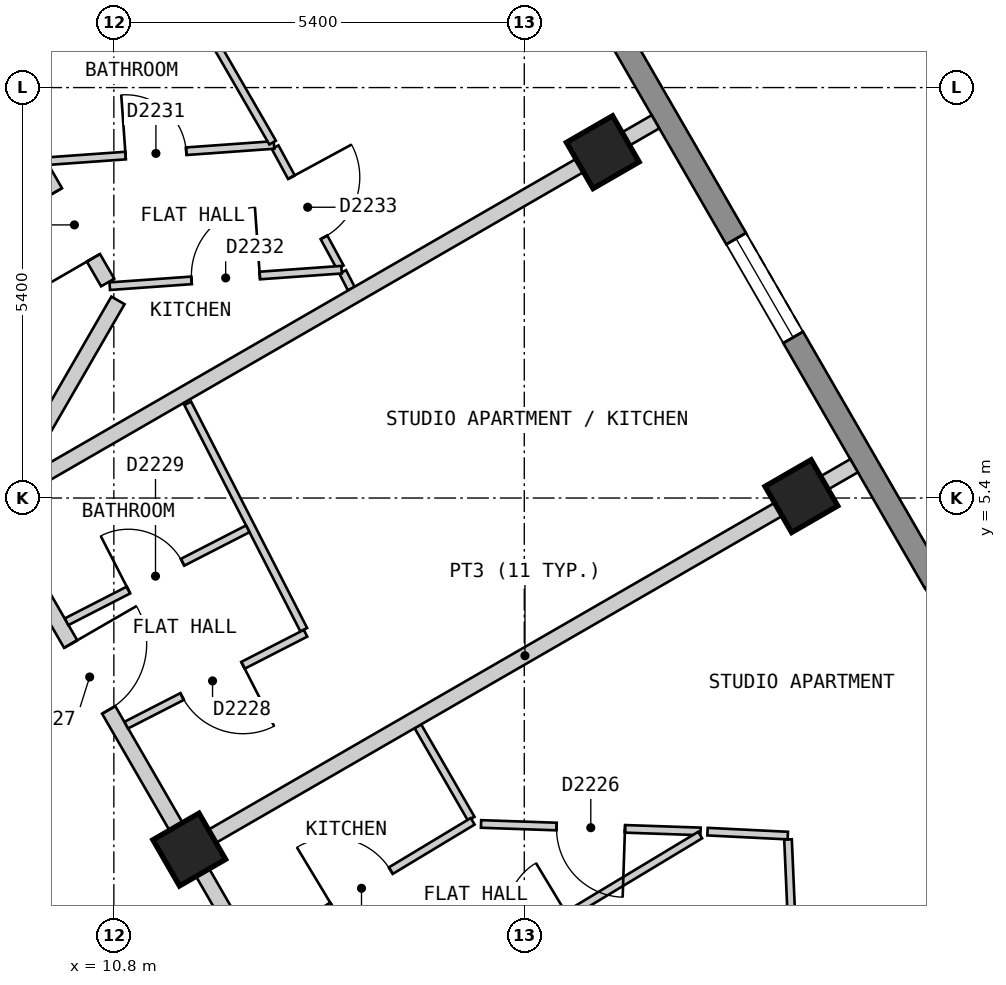
"""IFC4 building model, lengths in metres.
Left out: names, types, materials, properties, quantities, classifications, styles, units other than length and angle.
Written with IfcOpenShell. Run it as: python <this file> out.ifc"""

import sys

from ifc_helpers import new_model, si_unit, direction, frame, frame_2d, origin, origin_2d, place, context, subcontext, project, spatial, polyline, rectangle, outline, extrude, element, fill, save


model = new_model("IFC4")
c1 = context("Model", 3, precision=1e-05, world=origin(), true_north=direction((0.0, 1.0)))
c2 = subcontext(c1, "Body", "Model", "MODEL_VIEW")
j1 = project(units=[si_unit("LENGTHUNIT", "METRE"), si_unit("PLANEANGLEUNIT", "RADIAN")], contexts=[c1])
p1 = place(None, origin())
s1 = spatial("IfcSite", under=j1, at=p1, CompositionType="ELEMENT")
p2 = place(p1, origin())
s2 = spatial("IfcBuilding", under=s1, at=p2, CompositionType="ELEMENT")
p3 = place(p2, frame((0.0, 0.0, 229.8)))
s3 = spatial("IfcBuildingStorey", under=s2, at=p3, CompositionType="ELEMENT", Elevation=229.8)
for number, where, z_axis, x_axis in (
    (1, (19.846, 5.425, 0.0), (0.0, 0.0, 1.0), (-0.5, 0.866, 0.0)),
    (2, (17.233, 9.95, 0.0), (0.0, 0.0, 1.0), (-0.5, 0.866, 0.0)),
    (3, (11.792, 0.775, 0.0), (0.0, 0.0, 1.0), (-0.5, 0.866, 0.0)),
):
    element("IfcColumn", number, at=place(p3, frame(where, z_axis=z_axis, x_axis=x_axis)), inside=s3, PredefinedType="COLUMN", context=c2, shape_type="SweptSolid", body=[
        extrude(rectangle(XDim=0.7, YDim=0.7, at=origin_2d()), origin(), (0.0, 0.0, 1.0), 3.0),
    ])
p4 = place(p3, frame((23.599, 0.825, 0.0), z_axis=(0.0, 0.0, 1.0), x_axis=(-0.500003656944, 0.866023292436, 0.0)))
e4 = element("IfcWall", 4, at=p4, inside=s3, PredefinedType="SOLIDWALL", context=c2, shape_type="SweptSolid", body=[
    extrude(outline(polyline([(0.0, -0.15), (22.17, -0.15), (22.09, 0.15), (0.08, 0.15), (0.0, -0.15)])), origin(), (0.0, 0.0, 1.0), 2.7),
])
p5 = place(p4, frame((2.497, 0.0, 0.15)))
e5 = element("IfcOpeningElement", 5, at=p5, cuts=e4, PredefinedType="OPENING", context=c2, shape_type="SweptSolid", body=[
    extrude(rectangle(XDim=1.5, YDim=2.1, at=frame_2d((0.75, 1.05))), frame((0.0, 0.16, 0.0), z_axis=(0.0, -1.0, 0.0), x_axis=(1.0, 0.0, 0.0)), (0.0, 0.0, 1.0), 0.32),
])
p6 = place(p4, frame((7.723, 0.0, 0.15)))
e6 = element("IfcOpeningElement", 6, at=p6, cuts=e4, PredefinedType="OPENING", context=c2, shape_type="SweptSolid", body=[
    extrude(rectangle(XDim=1.5, YDim=2.1, at=frame_2d((0.75, 1.05))), frame((0.0, 0.16, 0.0), z_axis=(0.0, -1.0, 0.0), x_axis=(1.0, 0.0, 0.0)), (0.0, 0.0, 1.0), 0.32),
])
p7 = place(p4, frame((12.948, 0.0, 0.15)))
e7 = element("IfcOpeningElement", 7, at=p7, cuts=e4, PredefinedType="OPENING", context=c2, shape_type="SweptSolid", body=[
    extrude(rectangle(XDim=1.5, YDim=2.1, at=frame_2d((0.75, 1.05))), frame((0.0, 0.16, 0.0), z_axis=(0.0, -1.0, 0.0), x_axis=(1.0, 0.0, 0.0)), (0.0, 0.0, 1.0), 0.32),
])
p8 = place(p4, frame((18.173, 0.0, 0.15)))
e8 = element("IfcOpeningElement", 8, at=p8, cuts=e4, PredefinedType="OPENING", context=c2, shape_type="SweptSolid", body=[
    extrude(rectangle(XDim=1.5, YDim=2.1, at=frame_2d((0.75, 1.05))), frame((0.0, 0.16, 0.0), z_axis=(0.0, -1.0, 0.0), x_axis=(1.0, 0.0, 0.0)), (0.0, 0.0, 1.0), 0.32),
])
p9 = place(p3, frame((9.238, 5.2, 0.0), z_axis=(0.0, 0.0, 1.0), x_axis=(0.500025705601, -0.86601056214, 0.0)))
e9 = element("IfcWall", 9, at=p9, inside=s3, PredefinedType="PARTITIONING", context=c2, shape_type="SweptSolid", body=[
    extrude(rectangle(XDim=7.735, YDim=0.2, at=frame_2d((3.868, 0.0))), origin(), (0.0, 0.0, 1.0), 2.7),
])
p10 = place(p9, frame((6.898, 0.0, 0.0)))
e10 = element("IfcOpeningElement", 10, at=p10, cuts=e9, PredefinedType="OPENING", context=c2, shape_type="SweptSolid", body=[
    extrude(rectangle(XDim=0.8, YDim=2.1, at=frame_2d((0.4, 1.05))), frame((0.0, 0.11, 0.0), z_axis=(0.0, -1.0, 0.0), x_axis=(1.0, 0.0, 0.0)), (0.0, 0.0, 1.0), 0.22),
])
p11 = place(p9, frame((1.988, 0.0, 0.0)))
e11 = element("IfcOpeningElement", 11, at=p11, cuts=e9, PredefinedType="OPENING", context=c2, shape_type="SweptSolid", body=[
    extrude(rectangle(XDim=1.0, YDim=2.1, at=frame_2d((0.5, 1.05))), frame((0.0, 0.11, 0.0), z_axis=(0.0, -1.0, 0.0), x_axis=(1.0, 0.0, 0.0)), (0.0, 0.0, 1.0), 0.22),
])
p12 = place(p3, frame((5.485, 17.3, 0.0), z_axis=(0.0, 0.0, 1.0), x_axis=(0.500017221754, -0.866015460572, 0.0)))
e12 = element("IfcWall", 12, at=p12, inside=s3, PredefinedType="PARTITIONING", context=c2, shape_type="SweptSolid", body=[
    extrude(rectangle(XDim=10.468, YDim=0.2, at=frame_2d((5.234, 0.0))), origin(), (0.0, 0.0, 1.0), 2.7),
])
p13 = place(p12, frame((9.092, 0.0, 0.0)))
e13 = element("IfcOpeningElement", 13, at=p13, cuts=e12, PredefinedType="OPENING", context=c2, shape_type="SweptSolid", body=[
    extrude(rectangle(XDim=1.0, YDim=2.1, at=frame_2d((0.5, 1.05))), frame((0.0, 0.11, 0.0), z_axis=(0.0, -1.0, 0.0), x_axis=(1.0, 0.0, 0.0)), (0.0, 0.0, 1.0), 0.22),
])
p14 = place(p3, frame((9.354, 5.401, 0.0), z_axis=(0.0, 0.0, 1.0), x_axis=(0.499849222119, 0.866112437936, 0.0)))
e14 = element("IfcWall", 14, at=p14, inside=s3, PredefinedType="PARTITIONING", context=c2, shape_type="SweptSolid", body=[
    extrude(rectangle(XDim=3.001, YDim=0.2, at=frame_2d((1.5, 0.0))), origin(), (0.0, 0.0, 1.0), 2.7),
])
p15 = place(p3, frame((14.8, 2.397, 0.0), z_axis=(0.0, 0.0, 1.0), x_axis=(0.49989805765, -0.866084252228, 0.0)))
e15 = element("IfcWall", 15, at=p15, inside=s3, PredefinedType="PARTITIONING", context=c2, shape_type="SweptSolid", body=[
    extrude(rectangle(XDim=1.404, YDim=0.1, at=frame_2d((0.702, 0.0))), origin(), (0.0, 0.0, 1.0), 2.7),
])
p16 = place(p3, frame((12.922, 10.016, 0.0), z_axis=(0.0, 0.0, 1.0), x_axis=(0.476510550025, -0.879168752695, 0.0)))
e16 = element("IfcWall", 16, at=p16, inside=s3, PredefinedType="PARTITIONING", context=c2, shape_type="SweptSolid", body=[
    extrude(rectangle(XDim=1.798, YDim=0.1, at=frame_2d((0.899, 0.0))), origin(), (0.0, 0.0, 1.0), 2.7),
])
p17 = place(p16, frame((0.449, 0.0, 0.0)))
e17 = element("IfcOpeningElement", 17, at=p17, cuts=e16, PredefinedType="OPENING", context=c2, shape_type="SweptSolid", body=[
    extrude(rectangle(XDim=0.9, YDim=2.1, at=frame_2d((0.45, 1.05))), frame((0.0, 0.06, 0.0), z_axis=(0.0, -1.0, 0.0), x_axis=(1.0, 0.0, 0.0)), (0.0, 0.0, 1.0), 0.12),
])
p18 = place(p3, frame((13.811, 8.375, 0.0), z_axis=(0.0, 0.0, 1.0), x_axis=(0.457058020142, -0.889436881529, 0.0)))
e18 = element("IfcWall", 18, at=p18, inside=s3, PredefinedType="PARTITIONING", context=c2, shape_type="SweptSolid", body=[
    extrude(rectangle(XDim=0.247, YDim=0.1, at=frame_2d((0.124, 0.0))), origin(), (0.0, 0.0, 1.0), 2.7),
])
p19 = place(p3, frame((11.772, 6.646, 0.0), z_axis=(0.0, 0.0, 1.0), x_axis=(0.456175983405, -0.889889584254, 0.0)))
e19 = element("IfcWall", 19, at=p19, inside=s3, PredefinedType="PARTITIONING", context=c2, shape_type="SweptSolid", body=[
    extrude(rectangle(XDim=3.348, YDim=0.1, at=frame_2d((1.674, 0.0))), origin(), (0.0, 0.0, 1.0), 2.7),
])
p20 = place(p3, frame((19.67, 0.909, 0.0), z_axis=(0.0, 0.0, 1.0), x_axis=(0.043933486644, -0.99903445824, 0.0)))
e20 = element("IfcWall", 20, at=p20, inside=s3, PredefinedType="PARTITIONING", context=c2, shape_type="SweptSolid", body=[
    extrude(rectangle(XDim=3.373, YDim=0.1, at=frame_2d((1.687, 0.0))), origin(), (0.0, 0.0, 1.0), 2.7),
])
p21 = place(p3, frame((15.631, 1.112, 0.0), z_axis=(0.0, 0.0, 1.0), x_axis=(0.999423034213, -0.033964668168, 0.0)))
e21 = element("IfcWall", 21, at=p21, inside=s3, PredefinedType="PARTITIONING", context=c2, shape_type="SweptSolid", body=[
    extrude(rectangle(XDim=2.89, YDim=0.1, at=frame_2d((1.445, 0.0))), origin(), (0.0, 0.0, 1.0), 2.7),
])
p22 = place(p21, frame((0.995, 0.0, 0.0)))
e22 = element("IfcOpeningElement", 22, at=p22, cuts=e21, PredefinedType="OPENING", context=c2, shape_type="SweptSolid", body=[
    extrude(rectangle(XDim=0.9, YDim=2.1, at=frame_2d((0.45, 1.05))), frame((0.0, 0.06, 0.0), z_axis=(0.0, -1.0, 0.0), x_axis=(1.0, 0.0, 0.0)), (0.0, 0.0, 1.0), 0.12),
])
p23 = place(p3, frame((10.178, 3.772, 0.0), z_axis=(0.0, 0.0, 1.0), x_axis=(0.889732071959, 0.456483121405, 0.0)))
e23 = element("IfcWall", 23, at=p23, inside=s3, PredefinedType="PARTITIONING", context=c2, shape_type="SweptSolid", body=[
    extrude(rectangle(XDim=2.679, YDim=0.1, at=frame_2d((1.34, 0.0))), origin(), (0.0, 0.0, 1.0), 2.7),
])
p24 = place(p23, frame((0.915, 0.0, 0.0)))
e24 = element("IfcOpeningElement", 24, at=p24, cuts=e23, PredefinedType="OPENING", context=c2, shape_type="SweptSolid", body=[
    extrude(rectangle(XDim=0.8, YDim=2.1, at=frame_2d((0.4, 1.05))), frame((0.0, 0.06, 0.0), z_axis=(0.0, -1.0, 0.0), x_axis=(1.0, 0.0, 0.0)), (0.0, 0.0, 1.0), 0.12),
])
p25 = place(p3, frame((10.963, 2.412, 0.0), z_axis=(0.0, 0.0, 1.0), x_axis=(0.889943997558, 0.456069820543, 0.0)))
e25 = element("IfcWall", 25, at=p25, inside=s3, PredefinedType="PARTITIONING", context=c2, shape_type="SweptSolid", body=[
    extrude(rectangle(XDim=2.651, YDim=0.1, at=frame_2d((1.325, 0.0))), origin(), (0.0, 0.0, 1.0), 2.7),
])
p26 = place(p25, frame((0.826, 0.0, 0.0)))
e26 = element("IfcOpeningElement", 26, at=p26, cuts=e25, PredefinedType="OPENING", context=c2, shape_type="SweptSolid", body=[
    extrude(rectangle(XDim=0.9, YDim=2.1, at=frame_2d((0.45, 1.05))), frame((0.0, 0.06, 0.0), z_axis=(0.0, -1.0, 0.0), x_axis=(1.0, 0.0, 0.0)), (0.0, 0.0, 1.0), 0.12),
])
p27 = place(p3, frame((12.681, -0.564, 0.0), z_axis=(0.0, 0.0, 1.0), x_axis=(0.856575482301, 0.516021746752, 0.0)))
e27 = element("IfcWall", 27, at=p27, inside=s3, PredefinedType="PARTITIONING", context=c2, shape_type="SweptSolid", body=[
    extrude(rectangle(XDim=3.316, YDim=0.1, at=frame_2d((1.658, 0.0))), origin(), (0.0, 0.0, 1.0), 2.7),
])
p28 = place(p27, frame((1.158, 0.0, 0.0)))
e28 = element("IfcOpeningElement", 28, at=p28, cuts=e27, PredefinedType="OPENING", context=c2, shape_type="SweptSolid", body=[
    extrude(rectangle(XDim=0.9, YDim=2.1, at=frame_2d((0.45, 1.05))), frame((0.0, 0.06, 0.0), z_axis=(0.0, -1.0, 0.0), x_axis=(1.0, 0.0, 0.0)), (0.0, 0.0, 1.0), 0.12),
])
p29 = place(p3, frame((14.423, -1.499, 0.0), z_axis=(0.0, 0.0, 1.0), x_axis=(0.856512638305, 0.516126050905, 0.0)))
e29 = element("IfcWall", 29, at=p29, inside=s3, PredefinedType="PARTITIONING", context=c2, shape_type="SweptSolid", body=[
    extrude(rectangle(XDim=4.776, YDim=0.1, at=frame_2d((2.388, 0.0))), origin(), (0.0, 0.0, 1.0), 2.7),
])
p30 = place(p29, frame((1.936, 0.0, 0.0)))
e30 = element("IfcOpeningElement", 30, at=p30, cuts=e29, PredefinedType="OPENING", context=c2, shape_type="SweptSolid", body=[
    extrude(rectangle(XDim=0.8, YDim=2.1, at=frame_2d((0.4, 1.05))), frame((0.0, 0.06, 0.0), z_axis=(0.0, -1.0, 0.0), x_axis=(1.0, 0.0, 0.0)), (0.0, 0.0, 1.0), 0.12),
])
p31 = place(p3, frame((10.746, 8.187, 0.0), z_axis=(0.0, 0.0, 1.0), x_axis=(0.997477310687, 0.070986017387, 0.0)))
e31 = element("IfcWall", 31, at=p31, inside=s3, PredefinedType="PARTITIONING", context=c2, shape_type="SweptSolid", body=[
    extrude(rectangle(XDim=3.058, YDim=0.1, at=frame_2d((1.529, 0.0))), origin(), (0.0, 0.0, 1.0), 2.7),
])
p32 = place(p31, frame((1.079, 0.0, 0.0)))
e32 = element("IfcOpeningElement", 32, at=p32, cuts=e31, PredefinedType="OPENING", context=c2, shape_type="SweptSolid", body=[
    extrude(rectangle(XDim=0.9, YDim=2.1, at=frame_2d((0.45, 1.05))), frame((0.0, 0.06, 0.0), z_axis=(0.0, -1.0, 0.0), x_axis=(1.0, 0.0, 0.0)), (0.0, 0.0, 1.0), 0.12),
])
p33 = place(p3, frame((9.912, 9.831, 0.0), z_axis=(0.0, 0.0, 1.0), x_axis=(0.997459937941, 0.071229714326, 0.0)))
e33 = element("IfcWall", 33, at=p33, inside=s3, PredefinedType="PARTITIONING", context=c2, shape_type="SweptSolid", body=[
    extrude(rectangle(XDim=3.002, YDim=0.1, at=frame_2d((1.501, 0.0))), origin(), (0.0, 0.0, 1.0), 2.7),
])
p34 = place(p33, frame((1.045, 0.0, 0.0)))
e34 = element("IfcOpeningElement", 34, at=p34, cuts=e33, PredefinedType="OPENING", context=c2, shape_type="SweptSolid", body=[
    extrude(rectangle(XDim=0.8, YDim=2.1, at=frame_2d((0.4, 1.05))), frame((0.0, 0.06, 0.0), z_axis=(0.0, -1.0, 0.0), x_axis=(1.0, 0.0, 0.0)), (0.0, 0.0, 1.0), 0.12),
])
p35 = place(p3, frame((11.879, 0.826, 0.0), z_axis=(0.0, 0.0, 1.0), x_axis=(0.866065245018, 0.499930986609, 0.0)))
e35 = element("IfcWall", 35, at=p35, inside=s3, PredefinedType="PARTITIONING", context=c2, shape_type="SweptSolid", body=[
    extrude(rectangle(XDim=10.0, YDim=0.2, at=frame_2d((5.0, 0.0))), origin(), (0.0, 0.0, 1.0), 2.7),
])
p36 = place(p3, frame((9.457, 5.461, 0.0), z_axis=(0.0, 0.0, 1.0), x_axis=(0.866043818878, 0.499968102766, 0.0)))
e36 = element("IfcWall", 36, at=p36, inside=s3, PredefinedType="PARTITIONING", context=c2, shape_type="SweptSolid", body=[
    extrude(rectangle(XDim=9.779, YDim=0.2, at=frame_2d((4.89, 0.0))), origin(), (0.0, 0.0, 1.0), 2.7),
])
p37 = place(p3, frame((9.079, 11.275, 0.0), z_axis=(0.0, 0.0, 1.0), x_axis=(0.866001485781, 0.500041424909, 0.0)))
e37 = element("IfcWall", 37, at=p37, inside=s3, PredefinedType="PARTITIONING", context=c2, shape_type="SweptSolid", body=[
    extrude(rectangle(XDim=7.2, YDim=0.2, at=frame_2d((3.6, 0.0))), origin(), (0.0, 0.0, 1.0), 2.7),
])
p38 = place(p3, frame((18.611, 1.011, 0.0), z_axis=(0.0, 0.0, 1.0), x_axis=(0.998789491469, -0.049188939117, 0.0)))
e38 = element("IfcWall", 38, at=p38, inside=s3, PredefinedType="PARTITIONING", context=c2, shape_type="SweptSolid", body=[
    extrude(rectangle(XDim=1.057, YDim=0.1, at=frame_2d((0.529, 0.0))), origin(), (0.0, 0.0, 1.0), 2.7),
])
p39 = place(p3, frame((11.417, 12.625, 0.0), z_axis=(0.0, 0.0, 1.0), x_axis=(0.500055103712, -0.865993587304, 0.0)))
e39 = element("IfcWall", 39, at=p39, inside=s3, PredefinedType="PARTITIONING", context=c2, shape_type="SweptSolid", body=[
    extrude(rectangle(XDim=2.944, YDim=0.1, at=frame_2d((1.472, 0.0))), origin(), (0.0, 0.0, 1.0), 2.7),
])
p40 = place(p6, origin())
e40 = element("IfcWindow", 40, at=p40, inside=s3, PartitioningType="SINGLE_PANEL", PredefinedType="WINDOW", context=c2, shape_type="SweptSolid", body=[
    extrude(rectangle(XDim=1.5, YDim=2.1, at=frame_2d((0.75, 1.05))), frame((0.0, 0.03, 0.0), z_axis=(0.0, -1.0, 0.0), x_axis=(1.0, 0.0, 0.0)), (0.0, 0.0, 1.0), 0.06),
])
fill(e6, e40)
p41 = place(p28, origin())
e41 = element("IfcDoor", 41, at=p41, inside=s3, OperationType="SINGLE_SWING_LEFT", PredefinedType="DOOR", context=c2, shape_type="SweptSolid", body=[
    extrude(rectangle(XDim=0.9, YDim=2.1, at=frame_2d((0.45, 1.05))), frame((0.0, 0.025, 0.0), z_axis=(0.0, -1.0, 0.0), x_axis=(1.0, 0.0, 0.0)), (0.0, 0.0, 1.0), 0.05),
])
fill(e28, e41)
p42 = place(p22, origin())
e42 = element("IfcDoor", 42, at=p42, inside=s3, OperationType="SINGLE_SWING_RIGHT", PredefinedType="DOOR", context=c2, shape_type="SweptSolid", body=[
    extrude(rectangle(XDim=0.9, YDim=2.1, at=frame_2d((0.45, 1.05))), frame((0.0, 0.025, 0.0), z_axis=(0.0, -1.0, 0.0), x_axis=(1.0, 0.0, 0.0)), (0.0, 0.0, 1.0), 0.05),
])
fill(e22, e42)
p43 = place(p11, origin())
e43 = element("IfcDoor", 43, at=p43, inside=s3, OperationType="SINGLE_SWING_LEFT", PredefinedType="DOOR", context=c2, shape_type="SweptSolid", body=[
    extrude(rectangle(XDim=1.0, YDim=2.1, at=frame_2d((0.5, 1.05))), frame((0.0, 0.025, 0.0), z_axis=(0.0, -1.0, 0.0), x_axis=(1.0, 0.0, 0.0)), (0.0, 0.0, 1.0), 0.05),
])
fill(e11, e43)
p44 = place(p26, origin())
e44 = element("IfcDoor", 44, at=p44, inside=s3, OperationType="SINGLE_SWING_RIGHT", PredefinedType="DOOR", context=c2, shape_type="SweptSolid", body=[
    extrude(rectangle(XDim=0.9, YDim=2.1, at=frame_2d((0.45, 1.05))), frame((0.0, 0.025, 0.0), z_axis=(0.0, -1.0, 0.0), x_axis=(1.0, 0.0, 0.0)), (0.0, 0.0, 1.0), 0.05),
])
fill(e26, e44)
p45 = place(p24, origin())
e45 = element("IfcDoor", 45, at=p45, inside=s3, OperationType="SINGLE_SWING_LEFT", PredefinedType="DOOR", context=c2, shape_type="SweptSolid", body=[
    extrude(rectangle(XDim=0.8, YDim=2.1, at=frame_2d((0.4, 1.05))), frame((0.0, 0.025, 0.0), z_axis=(0.0, -1.0, 0.0), x_axis=(1.0, 0.0, 0.0)), (0.0, 0.0, 1.0), 0.05),
])
fill(e24, e45)
p46 = place(p13, origin())
e46 = element("IfcDoor", 46, at=p46, inside=s3, OperationType="SINGLE_SWING_RIGHT", PredefinedType="DOOR", context=c2, shape_type="SweptSolid", body=[
    extrude(rectangle(XDim=1.0, YDim=2.1, at=frame_2d((0.5, 1.05))), frame((0.0, 0.025, 0.0), z_axis=(0.0, -1.0, 0.0), x_axis=(1.0, 0.0, 0.0)), (0.0, 0.0, 1.0), 0.05),
])
fill(e13, e46)
p47 = place(p34, origin())
e47 = element("IfcDoor", 47, at=p47, inside=s3, OperationType="SINGLE_SWING_LEFT", PredefinedType="DOOR", context=c2, shape_type="SweptSolid", body=[
    extrude(rectangle(XDim=0.8, YDim=2.1, at=frame_2d((0.4, 1.05))), frame((0.0, 0.025, 0.0), z_axis=(0.0, -1.0, 0.0), x_axis=(1.0, 0.0, 0.0)), (0.0, 0.0, 1.0), 0.05),
])
fill(e34, e47)
p48 = place(p32, origin())
e48 = element("IfcDoor", 48, at=p48, inside=s3, OperationType="SINGLE_SWING_RIGHT", PredefinedType="DOOR", context=c2, shape_type="SweptSolid", body=[
    extrude(rectangle(XDim=0.9, YDim=2.1, at=frame_2d((0.45, 1.05))), frame((0.0, 0.025, 0.0), z_axis=(0.0, -1.0, 0.0), x_axis=(1.0, 0.0, 0.0)), (0.0, 0.0, 1.0), 0.05),
])
fill(e32, e48)
p49 = place(p17, origin())
e49 = element("IfcDoor", 49, at=p49, inside=s3, OperationType="SINGLE_SWING_LEFT", PredefinedType="DOOR", context=c2, shape_type="SweptSolid", body=[
    extrude(rectangle(XDim=0.9, YDim=2.1, at=frame_2d((0.45, 1.05))), frame((0.0, 0.025, 0.0), z_axis=(0.0, -1.0, 0.0), x_axis=(1.0, 0.0, 0.0)), (0.0, 0.0, 1.0), 0.05),
])
fill(e17, e49)
save(model, sys.argv[1])
